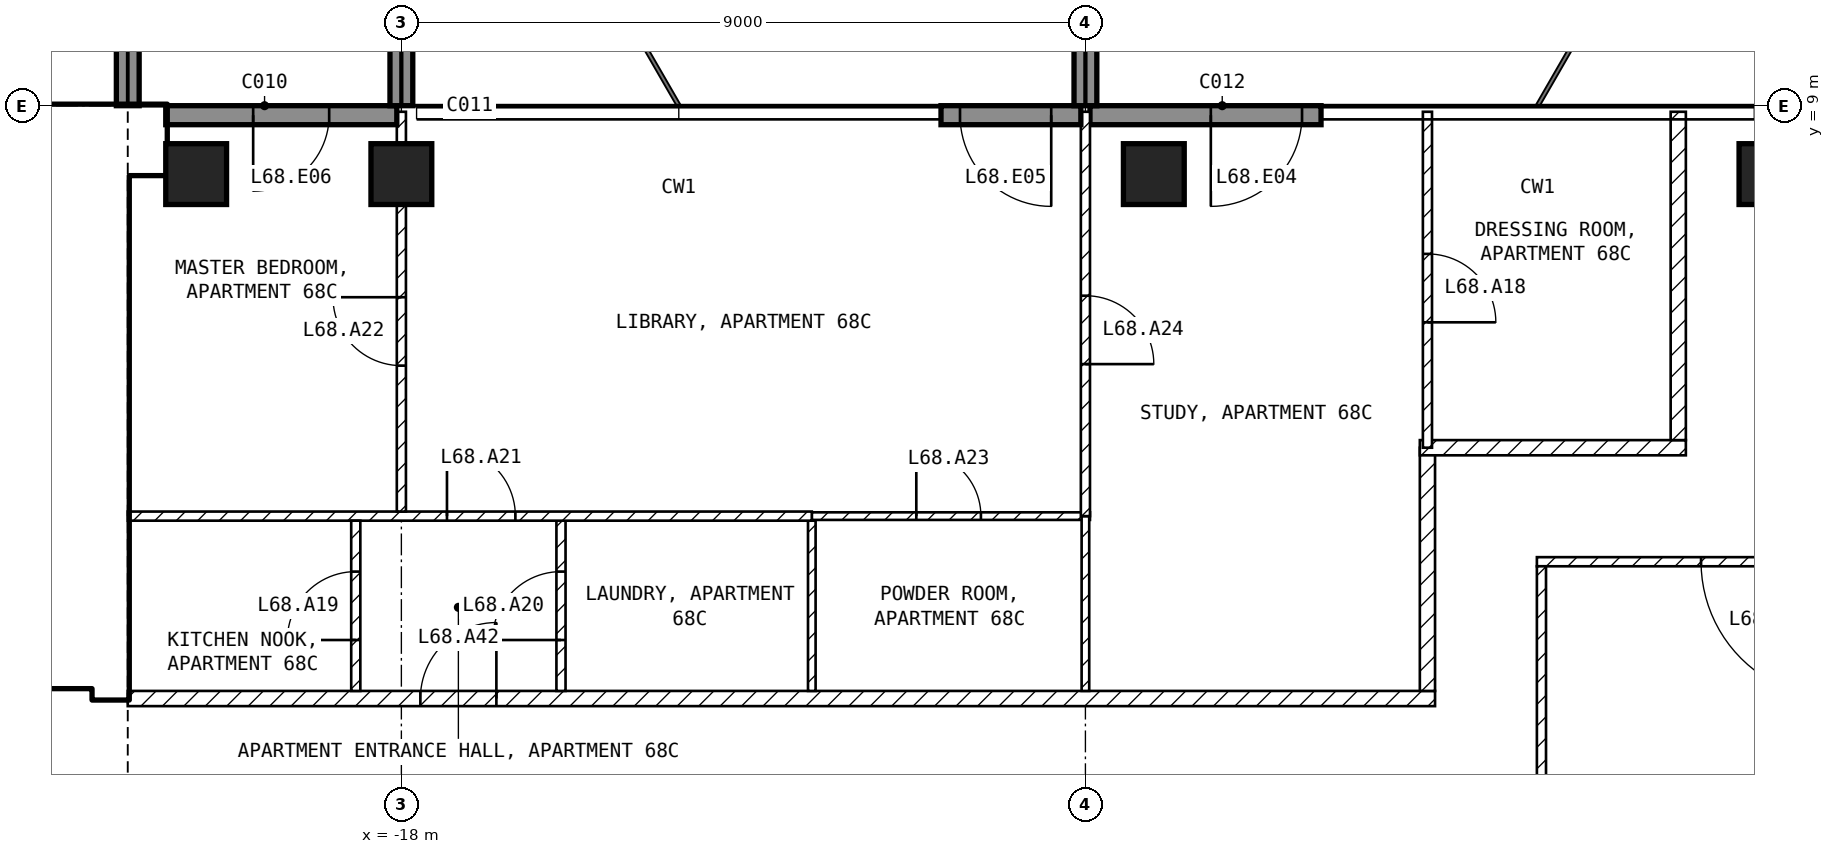
"""IFC4 building model, lengths in metres.
Left out: names, types, materials, properties, quantities, classifications, styles, units other than length and angle.
Written with IfcOpenShell. Run it as: python <this file> out.ifc"""

import sys

from ifc_helpers import new_model, si_unit, direction, frame, frame_2d, origin, origin_2d, place, context, subcontext, project, spatial, rectangle, extrude, element, fill, save


model = new_model("IFC4")
c1 = context("Model", 3, precision=1e-05, world=origin(), true_north=direction((0.0, 1.0)))
c2 = subcontext(c1, "Body", "Model", "MODEL_VIEW")
j1 = project(units=[si_unit("LENGTHUNIT", "METRE"), si_unit("PLANEANGLEUNIT", "RADIAN")], contexts=[c1])
p1 = place(None, origin())
s1 = spatial("IfcSite", under=j1, at=p1, CompositionType="ELEMENT")
p2 = place(p1, origin())
s2 = spatial("IfcBuilding", under=s1, at=p2, CompositionType="ELEMENT")
p3 = place(p2, frame((0.0, 0.0, 267.5)))
s3 = spatial("IfcBuildingStorey", under=s2, at=p3, CompositionType="ELEMENT", Elevation=267.5)
for number, where, z_axis, x_axis in (
    (1, (-20.7, 8.1, -0.25), (0.0, 0.0, 1.0), (1.0, 0.0, 0.0)),
    (2, (-18.0, 8.1, -0.25), (0.0, 0.0, 1.0), (1.0, 0.0, 0.0)),
    (3, (-8.1, 8.1, -0.25), (0.0, 0.0, 1.0), (1.0, 0.0, 0.0)),
    (4, (0.0, 8.1, -0.25), (0.0, 0.0, 1.0), (1.0, 0.0, 0.0)),
):
    element("IfcColumn", number, at=place(p3, frame(where, z_axis=z_axis, x_axis=x_axis)), inside=s3, PredefinedType="COLUMN", context=c2, shape_type="SweptSolid", body=[
        extrude(rectangle(XDim=0.8, YDim=0.8, at=origin_2d()), origin(), (0.0, 0.0, 1.0), 3.5),
    ])
p4 = place(p3, frame((-5.9, 8.875, 0.0), z_axis=(0.0, 0.0, 1.0), x_axis=(-1.0, 0.0, 0.0)))
e5 = element("IfcWall", 5, at=p4, inside=s3, PredefinedType="SOLIDWALL", context=c2, shape_type="SweptSolid", body=[
    extrude(rectangle(XDim=3.04, YDim=0.25, at=frame_2d((1.52, 0.0))), origin(), (0.0, 0.0, 1.0), 3.25),
])
p5 = place(p4, frame((0.25, 0.0, 0.0)))
e6 = element("IfcOpeningElement", 6, at=p5, cuts=e5, PredefinedType="OPENING", context=c2, shape_type="SweptSolid", body=[
    extrude(rectangle(XDim=1.2, YDim=2.4, at=frame_2d((0.6, 1.2))), frame((0.0, 0.135, 0.0), z_axis=(0.0, -1.0, 0.0), x_axis=(1.0, 0.0, 0.0)), (0.0, 0.0, 1.0), 0.27),
])
p6 = place(p3, frame((-9.06, 8.875, 0.0), z_axis=(0.0, 0.0, 1.0), x_axis=(-1.0, 0.0, 0.0)))
e7 = element("IfcWall", 7, at=p6, inside=s3, PredefinedType="SOLIDWALL", context=c2, shape_type="SweptSolid", body=[
    extrude(rectangle(XDim=1.84, YDim=0.25, at=frame_2d((0.92, 0.0))), origin(), (0.0, 0.0, 1.0), 3.25),
])
p7 = place(p6, frame((0.39, 0.0, 0.0)))
e8 = element("IfcOpeningElement", 8, at=p7, cuts=e7, PredefinedType="OPENING", context=c2, shape_type="SweptSolid", body=[
    extrude(rectangle(XDim=1.2, YDim=2.4, at=frame_2d((0.6, 1.2))), frame((0.0, 0.135, 0.0), z_axis=(0.0, -1.0, 0.0), x_axis=(1.0, 0.0, 0.0)), (0.0, 0.0, 1.0), 0.27),
])
p8 = place(p3, frame((-18.06, 8.875, 0.0), z_axis=(0.0, 0.0, 1.0), x_axis=(-1.0, 0.0, 0.0)))
e9 = element("IfcWall", 9, at=p8, inside=s3, PredefinedType="SOLIDWALL", context=c2, shape_type="SweptSolid", body=[
    extrude(rectangle(XDim=3.04, YDim=0.25, at=frame_2d((1.52, 0.0))), origin(), (0.0, 0.0, 1.0), 3.25),
])
p9 = place(p8, frame((0.89, 0.0, 0.0)))
e10 = element("IfcOpeningElement", 10, at=p9, cuts=e9, PredefinedType="OPENING", context=c2, shape_type="SweptSolid", body=[
    extrude(rectangle(XDim=1.0, YDim=2.4, at=frame_2d((0.5, 1.2))), frame((0.0, 0.135, 0.0), z_axis=(0.0, -1.0, 0.0), x_axis=(1.0, 0.0, 0.0)), (0.0, 0.0, 1.0), 0.27),
])
for number, where, z_axis, x_axis in (
    (11, (-21.6, 9.0, 0.0), (0.0, 0.0, 1.0), (0.0, 1.0, 0.0)),
    (12, (-18.0, 9.0, 0.0), (0.0, 0.0, 1.0), (0.0, 1.0, 0.0)),
    (13, (-9.0, 9.0, 0.0), (0.0, 0.0, 1.0), (0.0, 1.0, 0.0)),
):
    element("IfcWall", number, at=place(p3, frame(where, z_axis=z_axis, x_axis=x_axis)), inside=s3, PredefinedType="SOLIDWALL", context=c2, shape_type="SweptSolid", body=[
        extrude(rectangle(XDim=2.7, YDim=0.3, at=frame_2d((1.35, 0.0))), origin(), (0.0, 0.0, 1.0), 3.25),
    ])
p10 = place(p3, frame((-29.75, 8.55, 0.0), z_axis=(0.0, 0.0, 1.0), x_axis=(1.0, 0.0, 0.0)))
e14 = element("IfcWall", 14, at=p10, inside=s3, PredefinedType="SHEAR", context=c2, shape_type="SweptSolid", body=[
    extrude(rectangle(XDim=8.65, YDim=0.9, at=frame_2d((4.325, 0.0))), origin(), (0.0, 0.0, 1.0), 3.25),
])
p11 = place(p3, frame((-21.825, 1.2, 0.0), z_axis=(0.0, 0.0, 1.0), x_axis=(0.0, 1.0, 0.0)))
e15 = element("IfcWall", 15, at=p11, inside=s3, PredefinedType="SHEAR", context=c2, shape_type="SweptSolid", body=[
    extrude(rectangle(XDim=6.9, YDim=0.45, at=frame_2d((3.45, 0.0))), origin(), (0.0, 0.0, 1.0), 3.25),
])
p12 = place(p3, frame((-33.35, 1.45, 0.0), z_axis=(0.0, 0.0, 1.0), x_axis=(1.0, 0.0, 0.0)))
e16 = element("IfcWall", 16, at=p12, inside=s3, PredefinedType="SOLIDWALL", context=c2, shape_type="SweptSolid", body=[
    extrude(rectangle(XDim=11.3, YDim=0.2, at=frame_2d((5.65, 0.0))), origin(), (0.0, 0.0, 1.0), 3.25),
])
p13 = place(p12, frame((9.55, 0.0, 0.0)))
e17 = element("IfcOpeningElement", 17, at=p13, cuts=e16, PredefinedType="OPENING", context=c2, shape_type="SweptSolid", body=[
    extrude(rectangle(XDim=1.0, YDim=2.1, at=frame_2d((0.5, 1.05))), frame((0.0, 0.11, 0.0), z_axis=(0.0, -1.0, 0.0), x_axis=(1.0, 0.0, 0.0)), (0.0, 0.0, 1.0), 0.22),
])
p14 = place(p12, frame((7.05, 0.0, 0.0)))
e18 = element("IfcOpeningElement", 18, at=p14, cuts=e16, PredefinedType="OPENING", context=c2, shape_type="SweptSolid", body=[
    extrude(rectangle(XDim=1.0, YDim=2.1, at=frame_2d((0.5, 1.05))), frame((0.0, 0.11, 0.0), z_axis=(0.0, -1.0, 0.0), x_axis=(1.0, 0.0, 0.0)), (0.0, 0.0, 1.0), 0.22),
])
p15 = place(p12, frame((1.175, 0.0, 0.0)))
e19 = element("IfcOpeningElement", 19, at=p15, cuts=e16, PredefinedType="OPENING", context=c2, shape_type="SweptSolid", body=[
    extrude(rectangle(XDim=0.9, YDim=2.1, at=frame_2d((0.45, 1.05))), frame((0.0, 0.11, 0.0), z_axis=(0.0, -1.0, 0.0), x_axis=(1.0, 0.0, 0.0)), (0.0, 0.0, 1.0), 0.22),
])
p16 = place(p3, frame((-28.35, 5.15, 0.0), z_axis=(0.0, 0.0, 1.0), x_axis=(1.0, 0.0, 0.0)))
e20 = element("IfcWall", 20, at=p16, inside=s3, PredefinedType="SOLIDWALL", context=c2, shape_type="SweptSolid", body=[
    extrude(rectangle(XDim=6.3, YDim=0.2, at=frame_2d((3.15, 0.0))), origin(), (0.0, 0.0, 1.0), 3.25),
])
p17 = place(p16, frame((5.1, 0.0, 0.0)))
e21 = element("IfcOpeningElement", 21, at=p17, cuts=e20, PredefinedType="OPENING", context=c2, shape_type="SweptSolid", body=[
    extrude(rectangle(XDim=1.0, YDim=2.1, at=frame_2d((0.5, 1.05))), frame((0.0, 0.11, 0.0), z_axis=(0.0, -1.0, 0.0), x_axis=(1.0, 0.0, 0.0)), (0.0, 0.0, 1.0), 0.22),
])
p18 = place(p3, frame((3.06, 3.0, 0.0), z_axis=(0.0, 0.0, 1.0), x_axis=(-1.0, 0.0, 0.0)))
e22 = element("IfcWall", 22, at=p18, inside=s3, PredefinedType="PARTITIONING", context=c2, shape_type="SweptSolid", body=[
    extrude(rectangle(XDim=6.12, YDim=0.12, at=frame_2d((3.06, 0.0))), origin(), (0.0, 0.0, 1.0), 3.25),
])
p19 = place(p18, frame((2.16, 0.0, 0.0)))
e23 = element("IfcOpeningElement", 23, at=p19, cuts=e22, PredefinedType="OPENING", context=c2, shape_type="SweptSolid", body=[
    extrude(rectangle(XDim=1.8, YDim=2.1, at=frame_2d((0.9, 1.05))), frame((0.0, 0.07, 0.0), z_axis=(0.0, -1.0, 0.0), x_axis=(1.0, 0.0, 0.0)), (0.0, 0.0, 1.0), 0.14),
])
p20 = place(p3, frame((-3.0, 2.94, 0.0), z_axis=(0.0, 0.0, 1.0), x_axis=(0.0, -1.0, 0.0)))
e24 = element("IfcWall", 24, at=p20, inside=s3, PredefinedType="PARTITIONING", context=c2, shape_type="SweptSolid", body=[
    extrude(rectangle(XDim=5.88, YDim=0.12, at=frame_2d((2.94, 0.0))), origin(), (0.0, 0.0, 1.0), 3.25),
])
p21 = place(p3, frame((-21.6, 1.2, 0.0), z_axis=(0.0, 0.0, 1.0), x_axis=(1.0, 0.0, 0.0)))
e25 = element("IfcWall", 25, at=p21, inside=s3, PredefinedType="PARTITIONING", context=c2, shape_type="SweptSolid", body=[
    extrude(rectangle(XDim=17.2, YDim=0.2, at=frame_2d((8.6, 0.0))), origin(), (0.0, 0.0, 1.0), 3.25),
])
p22 = place(p21, frame((3.85, 0.0, 0.0)))
e26 = element("IfcOpeningElement", 26, at=p22, cuts=e25, PredefinedType="OPENING", context=c2, shape_type="SweptSolid", body=[
    extrude(rectangle(XDim=1.0, YDim=2.1, at=frame_2d((0.5, 1.05))), frame((0.0, 0.11, 0.0), z_axis=(0.0, -1.0, 0.0), x_axis=(1.0, 0.0, 0.0)), (0.0, 0.0, 1.0), 0.22),
])
p23 = place(p3, frame((-4.5, 1.3, 0.0), z_axis=(0.0, 0.0, 1.0), x_axis=(0.0, 1.0, 0.0)))
e27 = element("IfcWall", 27, at=p23, inside=s3, PredefinedType="PARTITIONING", context=c2, shape_type="SweptSolid", body=[
    extrude(rectangle(XDim=3.2, YDim=0.2, at=frame_2d((1.6, 0.0))), origin(), (0.0, 0.0, 1.0), 3.25),
])
p24 = place(p3, frame((-4.6, 4.5, 0.0), z_axis=(0.0, 0.0, 1.0), x_axis=(1.0, 0.0, 0.0)))
e28 = element("IfcWall", 28, at=p24, inside=s3, PredefinedType="PARTITIONING", context=c2, shape_type="SweptSolid", body=[
    extrude(rectangle(XDim=3.5, YDim=0.2, at=frame_2d((1.75, 0.0))), origin(), (0.0, 0.0, 1.0), 3.25),
])
p25 = place(p3, frame((-1.2, 4.6, 0.0), z_axis=(0.0, 0.0, 1.0), x_axis=(0.0, 1.0, 0.0)))
e29 = element("IfcWall", 29, at=p25, inside=s3, PredefinedType="PARTITIONING", context=c2, shape_type="SweptSolid", body=[
    extrude(rectangle(XDim=4.32, YDim=0.2, at=frame_2d((2.16, 0.0))), origin(), (0.0, 0.0, 1.0), 3.25),
])
p26 = place(p3, frame((-12.6, 1.3, 0.0), z_axis=(0.0, 0.0, 1.0), x_axis=(0.0, 1.0, 0.0)))
e30 = element("IfcWall", 30, at=p26, inside=s3, PredefinedType="PARTITIONING", context=c2, shape_type="SweptSolid", body=[
    extrude(rectangle(XDim=2.24, YDim=0.1, at=frame_2d((1.12, 0.0))), origin(), (0.0, 0.0, 1.0), 3.25),
])
p27 = place(p3, frame((-12.6, 3.6, 0.0), z_axis=(0.0, 0.0, 1.0), x_axis=(1.0, 0.0, 0.0)))
e31 = element("IfcWall", 31, at=p27, inside=s3, PredefinedType="PARTITIONING", context=c2, shape_type="SweptSolid", body=[
    extrude(rectangle(XDim=3.66, YDim=0.1, at=frame_2d((1.83, 0.0))), origin(), (0.0, 0.0, 1.0), 3.25),
])
p28 = place(p27, frame((1.375, 0.0, 0.0)))
e32 = element("IfcOpeningElement", 32, at=p28, cuts=e31, PredefinedType="OPENING", context=c2, shape_type="SweptSolid", body=[
    extrude(rectangle(XDim=0.85, YDim=2.1, at=frame_2d((0.425, 1.05))), frame((0.0, 0.06, 0.0), z_axis=(0.0, -1.0, 0.0), x_axis=(1.0, 0.0, 0.0)), (0.0, 0.0, 1.0), 0.12),
])
p29 = place(p3, frame((-9.0, 3.6, 0.0), z_axis=(0.0, 0.0, 1.0), x_axis=(0.0, -1.0, 0.0)))
e33 = element("IfcWall", 33, at=p29, inside=s3, PredefinedType="PARTITIONING", context=c2, shape_type="SweptSolid", body=[
    extrude(rectangle(XDim=2.3, YDim=0.1, at=frame_2d((1.15, 0.0))), origin(), (0.0, 0.0, 1.0), 3.25),
])
p30 = place(p3, frame((-15.9, 1.3, 0.0), z_axis=(0.0, 0.0, 1.0), x_axis=(0.0, 1.0, 0.0)))
e34 = element("IfcWall", 34, at=p30, inside=s3, PredefinedType="PARTITIONING", context=c2, shape_type="SweptSolid", body=[
    extrude(rectangle(XDim=2.24, YDim=0.12, at=frame_2d((1.12, 0.0))), origin(), (0.0, 0.0, 1.0), 3.25),
])
p31 = place(p30, frame((0.67, 0.0, 0.0)))
e35 = element("IfcOpeningElement", 35, at=p31, cuts=e34, PredefinedType="OPENING", context=c2, shape_type="SweptSolid", body=[
    extrude(rectangle(XDim=0.9, YDim=2.1, at=frame_2d((0.45, 1.05))), frame((0.0, 0.07, 0.0), z_axis=(0.0, -1.0, 0.0), x_axis=(1.0, 0.0, 0.0)), (0.0, 0.0, 1.0), 0.14),
])
p32 = place(p3, frame((-21.6, 3.6, 0.0), z_axis=(0.0, 0.0, 1.0), x_axis=(1.0, 0.0, 0.0)))
e36 = element("IfcWall", 36, at=p32, inside=s3, PredefinedType="PARTITIONING", context=c2, shape_type="SweptSolid", body=[
    extrude(rectangle(XDim=9.0, YDim=0.12, at=frame_2d((4.5, 0.0))), origin(), (0.0, 0.0, 1.0), 3.25),
])
p33 = place(p32, frame((4.2, 0.0, 0.0)))
e37 = element("IfcOpeningElement", 37, at=p33, cuts=e36, PredefinedType="OPENING", context=c2, shape_type="SweptSolid", body=[
    extrude(rectangle(XDim=0.9, YDim=2.1, at=frame_2d((0.45, 1.05))), frame((0.0, 0.07, 0.0), z_axis=(0.0, -1.0, 0.0), x_axis=(1.0, 0.0, 0.0)), (0.0, 0.0, 1.0), 0.14),
])
p34 = place(p3, frame((-18.6, 1.3, 0.0), z_axis=(0.0, 0.0, 1.0), x_axis=(0.0, 1.0, 0.0)))
e38 = element("IfcWall", 38, at=p34, inside=s3, PredefinedType="PARTITIONING", context=c2, shape_type="SweptSolid", body=[
    extrude(rectangle(XDim=2.24, YDim=0.12, at=frame_2d((1.12, 0.0))), origin(), (0.0, 0.0, 1.0), 3.25),
])
p35 = place(p34, frame((0.67, 0.0, 0.0)))
e39 = element("IfcOpeningElement", 39, at=p35, cuts=e38, PredefinedType="OPENING", context=c2, shape_type="SweptSolid", body=[
    extrude(rectangle(XDim=0.9, YDim=2.1, at=frame_2d((0.45, 1.05))), frame((0.0, 0.07, 0.0), z_axis=(0.0, -1.0, 0.0), x_axis=(1.0, 0.0, 0.0)), (0.0, 0.0, 1.0), 0.14),
])
p36 = place(p3, frame((-18.0, 3.66, 0.0), z_axis=(0.0, 0.0, 1.0), x_axis=(0.0, 1.0, 0.0)))
e40 = element("IfcWall", 40, at=p36, inside=s3, PredefinedType="PARTITIONING", context=c2, shape_type="SweptSolid", body=[
    extrude(rectangle(XDim=5.26, YDim=0.12, at=frame_2d((2.63, 0.0))), origin(), (0.0, 0.0, 1.0), 2.496),
])
p37 = place(p36, frame((1.92, 0.0, 0.0)))
e41 = element("IfcOpeningElement", 41, at=p37, cuts=e40, PredefinedType="OPENING", context=c2, shape_type="SweptSolid", body=[
    extrude(rectangle(XDim=0.9, YDim=2.1, at=frame_2d((0.45, 1.05))), frame((0.0, 0.07, 0.0), z_axis=(0.0, -1.0, 0.0), x_axis=(1.0, 0.0, 0.0)), (0.0, 0.0, 1.0), 0.14),
])
p38 = place(p3, frame((-9.0, 8.92, 0.0), z_axis=(0.0, 0.0, 1.0), x_axis=(0.0, -1.0, 0.0)))
e42 = element("IfcWall", 42, at=p38, inside=s3, PredefinedType="PARTITIONING", context=c2, shape_type="SweptSolid", body=[
    extrude(rectangle(XDim=5.32, YDim=0.12, at=frame_2d((2.66, 0.0))), origin(), (0.0, 0.0, 1.0), 3.25),
])
p39 = place(p38, frame((2.42, 0.0, 0.0)))
e43 = element("IfcOpeningElement", 43, at=p39, cuts=e42, PredefinedType="OPENING", context=c2, shape_type="SweptSolid", body=[
    extrude(rectangle(XDim=0.9, YDim=2.1, at=frame_2d((0.45, 1.05))), frame((0.0, 0.07, 0.0), z_axis=(0.0, -1.0, 0.0), x_axis=(1.0, 0.0, 0.0)), (0.0, 0.0, 1.0), 0.14),
])
p40 = place(p3, frame((-4.5, 8.92, 0.0), z_axis=(0.0, 0.0, 1.0), x_axis=(0.0, -1.0, 0.0)))
e44 = element("IfcWall", 44, at=p40, inside=s3, PredefinedType="PARTITIONING", context=c2, shape_type="SweptSolid", body=[
    extrude(rectangle(XDim=4.42, YDim=0.12, at=frame_2d((2.21, 0.0))), origin(), (0.0, 0.0, 1.0), 3.25),
])
p41 = place(p40, frame((1.87, 0.0, 0.0)))
e45 = element("IfcOpeningElement", 45, at=p41, cuts=e44, PredefinedType="OPENING", context=c2, shape_type="SweptSolid", body=[
    extrude(rectangle(XDim=0.9, YDim=2.1, at=frame_2d((0.45, 1.05))), frame((0.0, 0.07, 0.0), z_axis=(0.0, -1.0, 0.0), x_axis=(1.0, 0.0, 0.0)), (0.0, 0.0, 1.0), 0.14),
])
p42 = place(p5, origin())
e46 = element("IfcDoor", 46, at=p42, inside=s3, OperationType="SINGLE_SWING_RIGHT", PredefinedType="DOOR", context=c2, shape_type="SweptSolid", body=[
    extrude(rectangle(XDim=1.2, YDim=2.4, at=frame_2d((0.6, 1.2))), frame((0.0, 0.025, 0.0), z_axis=(0.0, -1.0, 0.0), x_axis=(1.0, 0.0, 0.0)), (0.0, 0.0, 1.0), 0.05),
])
fill(e6, e46)
p43 = place(p7, origin())
e47 = element("IfcDoor", 47, at=p43, inside=s3, OperationType="SINGLE_SWING_LEFT", PredefinedType="DOOR", context=c2, shape_type="SweptSolid", body=[
    extrude(rectangle(XDim=1.2, YDim=2.4, at=frame_2d((0.6, 1.2))), frame((0.0, 0.025, 0.0), z_axis=(0.0, -1.0, 0.0), x_axis=(1.0, 0.0, 0.0)), (0.0, 0.0, 1.0), 0.05),
])
fill(e8, e47)
p44 = place(p9, origin())
e48 = element("IfcDoor", 48, at=p44, inside=s3, OperationType="SINGLE_SWING_RIGHT", PredefinedType="DOOR", context=c2, shape_type="SweptSolid", body=[
    extrude(rectangle(XDim=1.0, YDim=2.4, at=frame_2d((0.5, 1.2))), frame((0.0, 0.025, 0.0), z_axis=(0.0, -1.0, 0.0), x_axis=(1.0, 0.0, 0.0)), (0.0, 0.0, 1.0), 0.05),
])
fill(e10, e48)
p45 = place(p17, origin())
e49 = element("IfcDoor", 49, at=p45, inside=s3, OperationType="SINGLE_SWING_LEFT", PredefinedType="DOOR", context=c2, shape_type="SweptSolid", body=[
    extrude(rectangle(XDim=1.0, YDim=2.1, at=frame_2d((0.5, 1.05))), frame((0.0, 0.025, 0.0), z_axis=(0.0, -1.0, 0.0), x_axis=(1.0, 0.0, 0.0)), (0.0, 0.0, 1.0), 0.05),
])
fill(e21, e49)
p46 = place(p19, origin())
e50 = element("IfcDoor", 50, at=p46, inside=s3, OperationType="SINGLE_SWING_LEFT", PredefinedType="DOOR", context=c2, shape_type="SweptSolid", body=[
    extrude(rectangle(XDim=1.8, YDim=2.1, at=frame_2d((0.9, 1.05))), frame((0.0, 0.025, 0.0), z_axis=(0.0, -1.0, 0.0), x_axis=(1.0, 0.0, 0.0)), (0.0, 0.0, 1.0), 0.05),
])
fill(e23, e50)
p47 = place(p41, origin())
e51 = element("IfcDoor", 51, at=p47, inside=s3, OperationType="SINGLE_SWING_RIGHT", PredefinedType="DOOR", context=c2, shape_type="SweptSolid", body=[
    extrude(rectangle(XDim=0.9, YDim=2.1, at=frame_2d((0.45, 1.05))), frame((0.0, 0.025, 0.0), z_axis=(0.0, -1.0, 0.0), x_axis=(1.0, 0.0, 0.0)), (0.0, 0.0, 1.0), 0.05),
])
fill(e45, e51)
p48 = place(p35, origin())
e52 = element("IfcDoor", 52, at=p48, inside=s3, OperationType="SINGLE_SWING_LEFT", PredefinedType="DOOR", context=c2, shape_type="SweptSolid", body=[
    extrude(rectangle(XDim=0.9, YDim=2.1, at=frame_2d((0.45, 1.05))), frame((0.0, 0.025, 0.0), z_axis=(0.0, -1.0, 0.0), x_axis=(1.0, 0.0, 0.0)), (0.0, 0.0, 1.0), 0.05),
])
fill(e39, e52)
p49 = place(p31, origin())
e53 = element("IfcDoor", 53, at=p49, inside=s3, OperationType="SINGLE_SWING_LEFT", PredefinedType="DOOR", context=c2, shape_type="SweptSolid", body=[
    extrude(rectangle(XDim=0.9, YDim=2.1, at=frame_2d((0.45, 1.05))), frame((0.0, 0.025, 0.0), z_axis=(0.0, -1.0, 0.0), x_axis=(1.0, 0.0, 0.0)), (0.0, 0.0, 1.0), 0.05),
])
fill(e35, e53)
p50 = place(p33, origin())
e54 = element("IfcDoor", 54, at=p50, inside=s3, OperationType="SINGLE_SWING_LEFT", PredefinedType="DOOR", context=c2, shape_type="SweptSolid", body=[
    extrude(rectangle(XDim=0.9, YDim=2.1, at=frame_2d((0.45, 1.05))), frame((0.0, 0.025, 0.0), z_axis=(0.0, -1.0, 0.0), x_axis=(1.0, 0.0, 0.0)), (0.0, 0.0, 1.0), 0.05),
])
fill(e37, e54)
p51 = place(p37, origin())
e55 = element("IfcDoor", 55, at=p51, inside=s3, OperationType="SINGLE_SWING_RIGHT", PredefinedType="DOOR", context=c2, shape_type="SweptSolid", body=[
    extrude(rectangle(XDim=0.9, YDim=2.1, at=frame_2d((0.45, 1.05))), frame((0.0, 0.025, 0.0), z_axis=(0.0, -1.0, 0.0), x_axis=(1.0, 0.0, 0.0)), (0.0, 0.0, 1.0), 0.05),
])
fill(e41, e55)
p52 = place(p28, origin())
e56 = element("IfcDoor", 56, at=p52, inside=s3, OperationType="SINGLE_SWING_LEFT", PredefinedType="DOOR", context=c2, shape_type="SweptSolid", body=[
    extrude(rectangle(XDim=0.85, YDim=2.1, at=frame_2d((0.425, 1.05))), frame((0.0, 0.025, 0.0), z_axis=(0.0, -1.0, 0.0), x_axis=(1.0, 0.0, 0.0)), (0.0, 0.0, 1.0), 0.05),
])
fill(e32, e56)
p53 = place(p39, origin())
e57 = element("IfcDoor", 57, at=p53, inside=s3, OperationType="SINGLE_SWING_RIGHT", PredefinedType="DOOR", context=c2, shape_type="SweptSolid", body=[
    extrude(rectangle(XDim=0.9, YDim=2.1, at=frame_2d((0.45, 1.05))), frame((0.0, 0.025, 0.0), z_axis=(0.0, -1.0, 0.0), x_axis=(1.0, 0.0, 0.0)), (0.0, 0.0, 1.0), 0.05),
])
fill(e43, e57)
p54 = place(p22, origin())
e58 = element("IfcDoor", 58, at=p54, inside=s3, OperationType="SINGLE_SWING_RIGHT", PredefinedType="DOOR", context=c2, shape_type="SweptSolid", body=[
    extrude(rectangle(XDim=1.0, YDim=2.1, at=frame_2d((0.5, 1.05))), frame((0.0, 0.025, 0.0), z_axis=(0.0, -1.0, 0.0), x_axis=(1.0, 0.0, 0.0)), (0.0, 0.0, 1.0), 0.05),
])
fill(e26, e58)
save(model, sys.argv[1])
